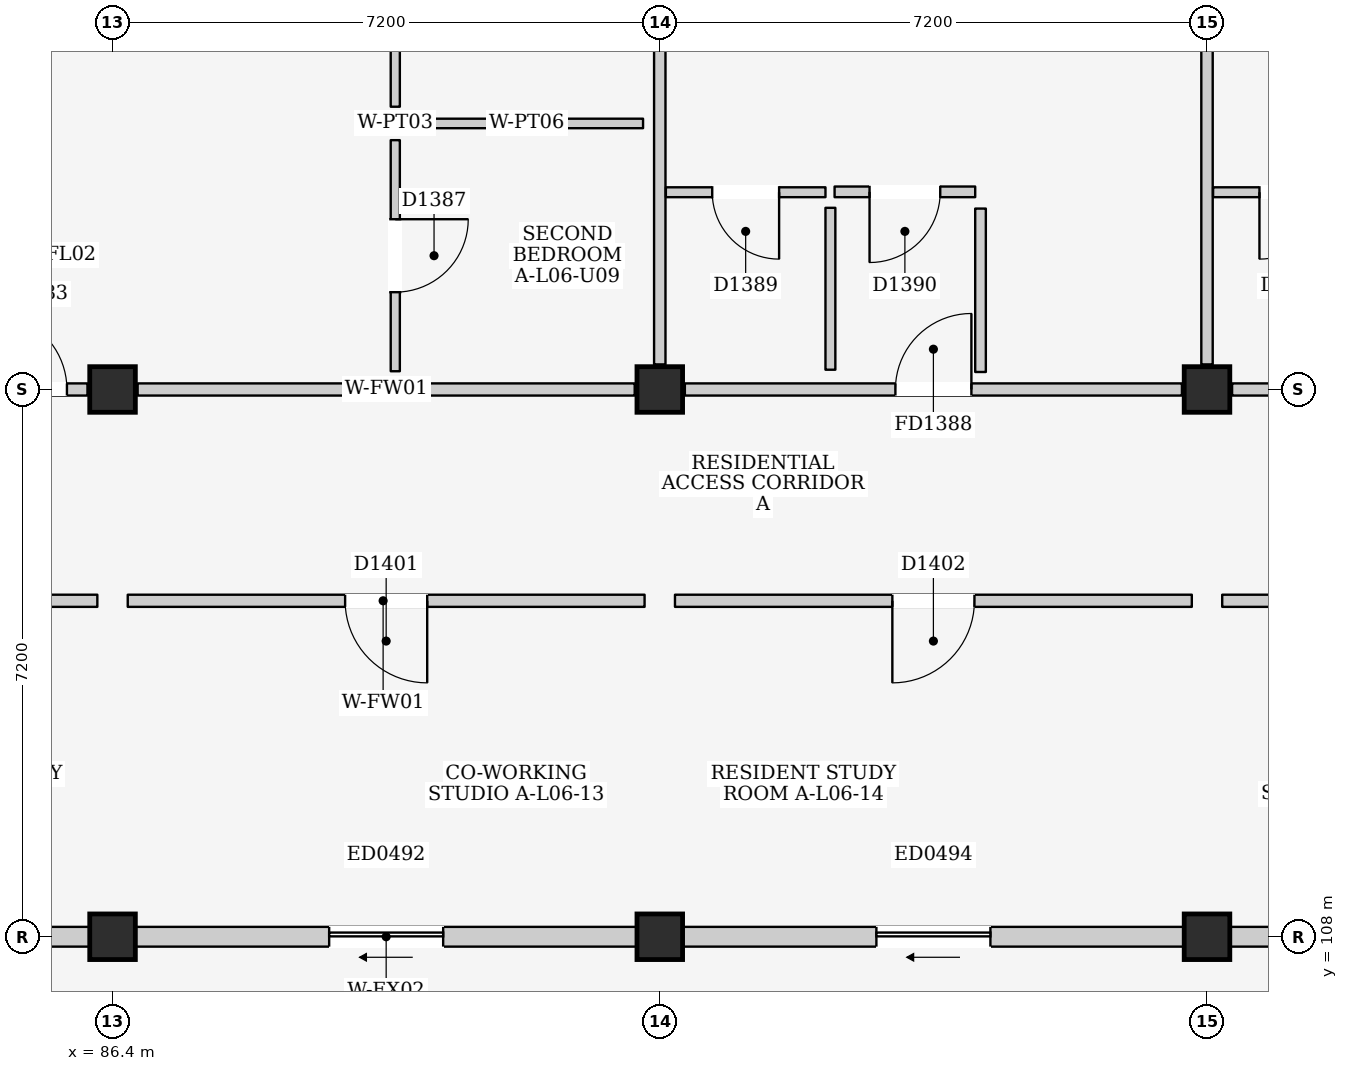
"""IFC4 building model, lengths in metres.
Left out: names, types, materials, properties, quantities, classifications, styles, units other than length and angle.
Written with IfcOpenShell. Run it as: python <this file> out.ifc"""

import sys

from ifc_helpers import new_model, si_unit, direction, frame, frame_2d, origin, origin_2d, place, context, subcontext, project, spatial, rectangle, extrude, element, fill, save


model = new_model("IFC4")
c1 = context("Model", 3, precision=1e-05, world=origin(), true_north=direction((0.0, 1.0)))
c2 = subcontext(c1, "Body", "Model", "MODEL_VIEW")
j1 = project(units=[si_unit("LENGTHUNIT", "METRE"), si_unit("PLANEANGLEUNIT", "RADIAN")], contexts=[c1])
p1 = place(None, origin())
s1 = spatial("IfcSite", under=j1, at=p1, CompositionType="ELEMENT")
p2 = place(p1, origin())
s2 = spatial("IfcBuilding", under=s1, at=p2, CompositionType="ELEMENT")
p3 = place(p2, frame((0.0, 0.0, 21.9)))
s3 = spatial("IfcBuildingStorey", under=s2, at=p3, CompositionType="ELEMENT", Elevation=21.9)
for number, where, z_axis, x_axis in (
    (1, (86.4, 108.0, 0.0), (0.0, 0.0, 1.0), (1.0, 0.0, 0.0)),
    (2, (86.4, 115.2, 0.0), (0.0, 0.0, 1.0), (1.0, 0.0, 0.0)),
    (3, (93.6, 108.0, 0.0), (0.0, 0.0, 1.0), (1.0, 0.0, 0.0)),
    (4, (93.6, 115.2, 0.0), (0.0, 0.0, 1.0), (1.0, 0.0, 0.0)),
    (5, (100.8, 108.0, 0.0), (0.0, 0.0, 1.0), (1.0, 0.0, 0.0)),
    (6, (100.8, 115.2, 0.0), (0.0, 0.0, 1.0), (1.0, 0.0, 0.0)),
):
    element("IfcColumn", number, at=place(p3, frame(where, z_axis=z_axis, x_axis=x_axis)), inside=s3, PredefinedType="COLUMN", context=c2, shape_type="SweptSolid", body=[
        extrude(rectangle(XDim=0.6, YDim=0.6, at=origin_2d()), origin(), (0.0, 0.0, 1.0), 3.2),
    ])
p4 = place(p3, frame((79.5, 108.0, 0.0), z_axis=(0.0, 0.0, 1.0), x_axis=(1.0, 0.0, 0.0)))
e7 = element("IfcWall", 7, at=p4, inside=s3, PredefinedType="ELEMENTEDWALL", context=c2, shape_type="SweptSolid", body=[
    extrude(rectangle(XDim=6.6, YDim=0.26, at=frame_2d((3.3, 0.0))), origin(), (0.0, 0.0, 1.0), 2.315),
])
p5 = place(p4, frame((2.55, 0.0, 0.0)))
e8 = element("IfcOpeningElement", 8, at=p5, cuts=e7, PredefinedType="OPENING", context=c2, shape_type="SweptSolid", body=[
    extrude(rectangle(XDim=1.5, YDim=2.12, at=frame_2d((0.75, 1.06))), frame((0.0, 0.145, 0.0), z_axis=(0.0, -1.0, 0.0), x_axis=(1.0, 0.0, 0.0)), (0.0, 0.0, 1.0), 0.29),
])
p6 = place(p3, frame((86.7, 108.0, 0.0), z_axis=(0.0, 0.0, 1.0), x_axis=(1.0, 0.0, 0.0)))
e9 = element("IfcWall", 9, at=p6, inside=s3, PredefinedType="ELEMENTEDWALL", context=c2, shape_type="SweptSolid", body=[
    extrude(rectangle(XDim=6.6, YDim=0.26, at=frame_2d((3.3, 0.0))), origin(), (0.0, 0.0, 1.0), 2.315),
])
p7 = place(p6, frame((2.55, 0.0, 0.0)))
e10 = element("IfcOpeningElement", 10, at=p7, cuts=e9, PredefinedType="OPENING", context=c2, shape_type="SweptSolid", body=[
    extrude(rectangle(XDim=1.5, YDim=2.12, at=frame_2d((0.75, 1.06))), frame((0.0, 0.145, 0.0), z_axis=(0.0, -1.0, 0.0), x_axis=(1.0, 0.0, 0.0)), (0.0, 0.0, 1.0), 0.29),
])
p8 = place(p3, frame((93.9, 108.0, 0.0), z_axis=(0.0, 0.0, 1.0), x_axis=(1.0, 0.0, 0.0)))
e11 = element("IfcWall", 11, at=p8, inside=s3, PredefinedType="ELEMENTEDWALL", context=c2, shape_type="SweptSolid", body=[
    extrude(rectangle(XDim=6.6, YDim=0.26, at=frame_2d((3.3, 0.0))), origin(), (0.0, 0.0, 1.0), 2.315),
])
p9 = place(p8, frame((2.55, 0.0, 0.0)))
e12 = element("IfcOpeningElement", 12, at=p9, cuts=e11, PredefinedType="OPENING", context=c2, shape_type="SweptSolid", body=[
    extrude(rectangle(XDim=1.5, YDim=2.12, at=frame_2d((0.75, 1.06))), frame((0.0, 0.145, 0.0), z_axis=(0.0, -1.0, 0.0), x_axis=(1.0, 0.0, 0.0)), (0.0, 0.0, 1.0), 0.29),
])
p10 = place(p3, frame((101.1, 108.0, 0.0), z_axis=(0.0, 0.0, 1.0), x_axis=(1.0, 0.0, 0.0)))
e13 = element("IfcWall", 13, at=p10, inside=s3, PredefinedType="ELEMENTEDWALL", context=c2, shape_type="SweptSolid", body=[
    extrude(rectangle(XDim=6.6, YDim=0.26, at=frame_2d((3.3, 0.0))), origin(), (0.0, 0.0, 1.0), 2.315),
])
p11 = place(p10, frame((2.55, 0.0, 0.0)))
e14 = element("IfcOpeningElement", 14, at=p11, cuts=e13, PredefinedType="OPENING", context=c2, shape_type="SweptSolid", body=[
    extrude(rectangle(XDim=1.5, YDim=2.12, at=frame_2d((0.75, 1.06))), frame((0.0, 0.145, 0.0), z_axis=(0.0, -1.0, 0.0), x_axis=(1.0, 0.0, 0.0)), (0.0, 0.0, 1.0), 0.29),
])
p12 = place(p3, frame((79.53, 115.2, 0.0), z_axis=(0.0, 0.0, 1.0), x_axis=(1.0, 0.0, 0.0)))
e15 = element("IfcWall", 15, at=p12, inside=s3, PredefinedType="PARTITIONING", context=c2, shape_type="SweptSolid", body=[
    extrude(rectangle(XDim=6.54, YDim=0.16, at=frame_2d((3.27, 0.0))), origin(), (0.0, 0.0, 1.0), 2.315),
])
p13 = place(p12, frame((5.27, 0.0, 0.0)))
e16 = element("IfcOpeningElement", 16, at=p13, cuts=e15, PredefinedType="OPENING", context=c2, shape_type="SweptSolid", body=[
    extrude(rectangle(XDim=1.0, YDim=2.15, at=frame_2d((0.5, 1.075))), frame((0.0, 0.095, 0.0), z_axis=(0.0, -1.0, 0.0), x_axis=(1.0, 0.0, 0.0)), (0.0, 0.0, 1.0), 0.19),
])
p14 = place(p3, frame((86.73, 115.2, 0.0), z_axis=(0.0, 0.0, 1.0), x_axis=(1.0, 0.0, 0.0)))
e17 = element("IfcWall", 17, at=p14, inside=s3, PredefinedType="PARTITIONING", context=c2, shape_type="SweptSolid", body=[
    extrude(rectangle(XDim=6.54, YDim=0.16, at=frame_2d((3.27, 0.0))), origin(), (0.0, 0.0, 1.0), 2.315),
])
p15 = place(p3, frame((93.6, 115.53, 0.0), z_axis=(0.0, 0.0, 1.0), x_axis=(0.0, 1.0, 0.0)))
e18 = element("IfcWall", 18, at=p15, inside=s3, PredefinedType="PARTITIONING", context=c2, shape_type="SweptSolid", body=[
    extrude(rectangle(XDim=6.54, YDim=0.15, at=frame_2d((3.27, 0.0))), origin(), (0.0, 0.0, 1.0), 2.465),
])
p16 = place(p3, frame((90.12, 118.92, 0.0), z_axis=(0.0, 0.0, 1.0), x_axis=(0.0, 1.0, 0.0)))
e19 = element("IfcWall", 19, at=p16, inside=s3, PredefinedType="PARTITIONING", context=c2, shape_type="SweptSolid", body=[
    extrude(rectangle(XDim=3.04, YDim=0.12, at=frame_2d((1.52, 0.0))), origin(), (0.0, 0.0, 1.0), 2.98),
])
p17 = place(p16, frame((1.045, 0.0, 0.0)))
e20 = element("IfcOpeningElement", 20, at=p17, cuts=e19, PredefinedType="OPENING", context=c2, shape_type="SweptSolid", body=[
    extrude(rectangle(XDim=0.95, YDim=2.15, at=frame_2d((0.475, 1.075))), frame((0.0, 0.075, 0.0), z_axis=(0.0, -1.0, 0.0), x_axis=(1.0, 0.0, 0.0)), (0.0, 0.0, 1.0), 0.15),
])
p18 = place(p3, frame((90.32, 118.7, 0.0), z_axis=(0.0, 0.0, 1.0), x_axis=(1.0, 0.0, 0.0)))
e21 = element("IfcWall", 21, at=p18, inside=s3, PredefinedType="PARTITIONING", context=c2, shape_type="SweptSolid", body=[
    extrude(rectangle(XDim=3.06, YDim=0.125, at=frame_2d((1.53, 0.0))), origin(), (0.0, 0.0, 1.0), 2.98),
])
p19 = place(p3, frame((90.12, 115.44, 0.0), z_axis=(0.0, 0.0, 1.0), x_axis=(0.0, 1.0, 0.0)))
e22 = element("IfcWall", 22, at=p19, inside=s3, PredefinedType="PARTITIONING", context=c2, shape_type="SweptSolid", body=[
    extrude(rectangle(XDim=3.04, YDim=0.12, at=frame_2d((1.52, 0.0))), origin(), (0.0, 0.0, 1.0), 2.98),
])
p20 = place(p19, frame((1.04, 0.0, 0.0)))
e23 = element("IfcOpeningElement", 23, at=p20, cuts=e22, PredefinedType="OPENING", context=c2, shape_type="SweptSolid", body=[
    extrude(rectangle(XDim=0.96, YDim=2.15, at=frame_2d((0.48, 1.075))), frame((0.0, 0.075, 0.0), z_axis=(0.0, -1.0, 0.0), x_axis=(1.0, 0.0, 0.0)), (0.0, 0.0, 1.0), 0.15),
])
p21 = place(p3, frame((93.93, 115.2, 0.0), z_axis=(0.0, 0.0, 1.0), x_axis=(1.0, 0.0, 0.0)))
e24 = element("IfcWall", 24, at=p21, inside=s3, PredefinedType="PARTITIONING", context=c2, shape_type="SweptSolid", body=[
    extrude(rectangle(XDim=6.54, YDim=0.16, at=frame_2d((3.27, 0.0))), origin(), (0.0, 0.0, 1.0), 2.315),
])
p22 = place(p21, frame((2.77, 0.0, 0.0)))
e25 = element("IfcOpeningElement", 25, at=p22, cuts=e24, PredefinedType="OPENING", context=c2, shape_type="SweptSolid", body=[
    extrude(rectangle(XDim=1.0, YDim=2.15, at=frame_2d((0.5, 1.075))), frame((0.0, 0.095, 0.0), z_axis=(0.0, -1.0, 0.0), x_axis=(1.0, 0.0, 0.0)), (0.0, 0.0, 1.0), 0.19),
])
p23 = place(p3, frame((100.8, 115.53, 0.0), z_axis=(0.0, 0.0, 1.0), x_axis=(0.0, 1.0, 0.0)))
e26 = element("IfcWall", 26, at=p23, inside=s3, PredefinedType="PARTITIONING", context=c2, shape_type="SweptSolid", body=[
    extrude(rectangle(XDim=6.54, YDim=0.15, at=frame_2d((3.27, 0.0))), origin(), (0.0, 0.0, 1.0), 2.465),
])
p24 = place(p3, frame((93.68, 117.795, 0.0), z_axis=(0.0, 0.0, 1.0), x_axis=(1.0, 0.0, 0.0)))
e27 = element("IfcWall", 27, at=p24, inside=s3, PredefinedType="PARTITIONING", context=c2, shape_type="SweptSolid", body=[
    extrude(rectangle(XDim=2.1, YDim=0.13, at=frame_2d((1.05, 0.0))), origin(), (0.0, 0.0, 1.0), 2.98),
])
p25 = place(p24, frame((0.61, 0.0, 0.0)))
e28 = element("IfcOpeningElement", 28, at=p25, cuts=e27, PredefinedType="OPENING", context=c2, shape_type="SweptSolid", body=[
    extrude(rectangle(XDim=0.88, YDim=2.1, at=frame_2d((0.44, 1.05))), frame((0.0, 0.08, 0.0), z_axis=(0.0, -1.0, 0.0), x_axis=(1.0, 0.0, 0.0)), (0.0, 0.0, 1.0), 0.16),
])
p26 = place(p3, frame((95.845, 115.46, 0.0), z_axis=(0.0, 0.0, 1.0), x_axis=(0.0, 1.0, 0.0)))
e29 = element("IfcWall", 29, at=p26, inside=s3, PredefinedType="PARTITIONING", context=c2, shape_type="SweptSolid", body=[
    extrude(rectangle(XDim=2.13, YDim=0.13, at=frame_2d((1.065, 0.0))), origin(), (0.0, 0.0, 1.0), 2.98),
])
p27 = place(p3, frame((95.9, 117.8, 0.0), z_axis=(0.0, 0.0, 1.0), x_axis=(1.0, 0.0, 0.0)))
e30 = element("IfcWall", 30, at=p27, inside=s3, PredefinedType="PARTITIONING", context=c2, shape_type="SweptSolid", body=[
    extrude(rectangle(XDim=1.85, YDim=0.14, at=frame_2d((0.925, 0.0))), origin(), (0.0, 0.0, 1.0), 2.98),
])
p28 = place(p27, frame((0.46, 0.0, 0.0)))
e31 = element("IfcOpeningElement", 31, at=p28, cuts=e30, PredefinedType="OPENING", context=c2, shape_type="SweptSolid", body=[
    extrude(rectangle(XDim=0.93, YDim=2.14, at=frame_2d((0.465, 1.07))), frame((0.0, 0.085, 0.0), z_axis=(0.0, -1.0, 0.0), x_axis=(1.0, 0.0, 0.0)), (0.0, 0.0, 1.0), 0.17),
])
p29 = place(p3, frame((97.82, 115.43, 0.0), z_axis=(0.0, 0.0, 1.0), x_axis=(0.0, 1.0, 0.0)))
e32 = element("IfcWall", 32, at=p29, inside=s3, PredefinedType="PARTITIONING", context=c2, shape_type="SweptSolid", body=[
    extrude(rectangle(XDim=2.15, YDim=0.14, at=frame_2d((1.075, 0.0))), origin(), (0.0, 0.0, 1.0), 2.98),
])
p30 = place(p3, frame((101.13, 115.2, 0.0), z_axis=(0.0, 0.0, 1.0), x_axis=(1.0, 0.0, 0.0)))
e33 = element("IfcWall", 33, at=p30, inside=s3, PredefinedType="PARTITIONING", context=c2, shape_type="SweptSolid", body=[
    extrude(rectangle(XDim=6.54, YDim=0.16, at=frame_2d((3.27, 0.0))), origin(), (0.0, 0.0, 1.0), 2.315),
])
p31 = place(p30, frame((2.77, 0.0, 0.0)))
e34 = element("IfcOpeningElement", 34, at=p31, cuts=e33, PredefinedType="OPENING", context=c2, shape_type="SweptSolid", body=[
    extrude(rectangle(XDim=1.0, YDim=2.15, at=frame_2d((0.5, 1.075))), frame((0.0, 0.095, 0.0), z_axis=(0.0, -1.0, 0.0), x_axis=(1.0, 0.0, 0.0)), (0.0, 0.0, 1.0), 0.19),
])
p32 = place(p3, frame((100.88, 117.795, 0.0), z_axis=(0.0, 0.0, 1.0), x_axis=(1.0, 0.0, 0.0)))
e35 = element("IfcWall", 35, at=p32, inside=s3, PredefinedType="PARTITIONING", context=c2, shape_type="SweptSolid", body=[
    extrude(rectangle(XDim=2.1, YDim=0.13, at=frame_2d((1.05, 0.0))), origin(), (0.0, 0.0, 1.0), 2.98),
])
p33 = place(p32, frame((0.61, 0.0, 0.0)))
e36 = element("IfcOpeningElement", 36, at=p33, cuts=e35, PredefinedType="OPENING", context=c2, shape_type="SweptSolid", body=[
    extrude(rectangle(XDim=0.88, YDim=2.1, at=frame_2d((0.44, 1.05))), frame((0.0, 0.08, 0.0), z_axis=(0.0, -1.0, 0.0), x_axis=(1.0, 0.0, 0.0)), (0.0, 0.0, 1.0), 0.16),
])
p34 = place(p3, frame((79.4, 112.42, 0.0), z_axis=(0.0, 0.0, 1.0), x_axis=(1.0, 0.0, 0.0)))
e37 = element("IfcWall", 37, at=p34, inside=s3, PredefinedType="PARTITIONING", context=c2, shape_type="SweptSolid", body=[
    extrude(rectangle(XDim=6.8, YDim=0.16, at=frame_2d((3.4, 0.0))), origin(), (0.0, 0.0, 1.0), 2.98),
])
p35 = place(p34, frame((2.86, 0.0, 0.0)))
e38 = element("IfcOpeningElement", 38, at=p35, cuts=e37, PredefinedType="OPENING", context=c2, shape_type="SweptSolid", body=[
    extrude(rectangle(XDim=1.08, YDim=2.22, at=frame_2d((0.54, 1.11))), frame((0.0, 0.095, 0.0), z_axis=(0.0, -1.0, 0.0), x_axis=(1.0, 0.0, 0.0)), (0.0, 0.0, 1.0), 0.19),
])
p36 = place(p3, frame((86.6, 112.42, 0.0), z_axis=(0.0, 0.0, 1.0), x_axis=(1.0, 0.0, 0.0)))
e39 = element("IfcWall", 39, at=p36, inside=s3, PredefinedType="PARTITIONING", context=c2, shape_type="SweptSolid", body=[
    extrude(rectangle(XDim=6.8, YDim=0.16, at=frame_2d((3.4, 0.0))), origin(), (0.0, 0.0, 1.0), 2.98),
])
p37 = place(p36, frame((2.86, 0.0, 0.0)))
e40 = element("IfcOpeningElement", 40, at=p37, cuts=e39, PredefinedType="OPENING", context=c2, shape_type="SweptSolid", body=[
    extrude(rectangle(XDim=1.08, YDim=2.22, at=frame_2d((0.54, 1.11))), frame((0.0, 0.095, 0.0), z_axis=(0.0, -1.0, 0.0), x_axis=(1.0, 0.0, 0.0)), (0.0, 0.0, 1.0), 0.19),
])
p38 = place(p3, frame((93.8, 112.42, 0.0), z_axis=(0.0, 0.0, 1.0), x_axis=(1.0, 0.0, 0.0)))
e41 = element("IfcWall", 41, at=p38, inside=s3, PredefinedType="PARTITIONING", context=c2, shape_type="SweptSolid", body=[
    extrude(rectangle(XDim=6.8, YDim=0.16, at=frame_2d((3.4, 0.0))), origin(), (0.0, 0.0, 1.0), 2.98),
])
p39 = place(p38, frame((2.86, 0.0, 0.0)))
e42 = element("IfcOpeningElement", 42, at=p39, cuts=e41, PredefinedType="OPENING", context=c2, shape_type="SweptSolid", body=[
    extrude(rectangle(XDim=1.08, YDim=2.22, at=frame_2d((0.54, 1.11))), frame((0.0, 0.095, 0.0), z_axis=(0.0, -1.0, 0.0), x_axis=(1.0, 0.0, 0.0)), (0.0, 0.0, 1.0), 0.19),
])
p40 = place(p3, frame((101.0, 112.42, 0.0), z_axis=(0.0, 0.0, 1.0), x_axis=(1.0, 0.0, 0.0)))
e43 = element("IfcWall", 43, at=p40, inside=s3, PredefinedType="PARTITIONING", context=c2, shape_type="SweptSolid", body=[
    extrude(rectangle(XDim=6.72, YDim=0.16, at=frame_2d((3.36, 0.0))), origin(), (0.0, 0.0, 1.0), 2.98),
])
p41 = place(p40, frame((2.82, 0.0, 0.0)))
e44 = element("IfcOpeningElement", 44, at=p41, cuts=e43, PredefinedType="OPENING", context=c2, shape_type="SweptSolid", body=[
    extrude(rectangle(XDim=1.08, YDim=2.22, at=frame_2d((0.54, 1.11))), frame((0.0, 0.095, 0.0), z_axis=(0.0, -1.0, 0.0), x_axis=(1.0, 0.0, 0.0)), (0.0, 0.0, 1.0), 0.19),
])
p42 = place(p7, frame((1.5, 0.0, 0.0), z_axis=(0.0, 0.0, 1.0), x_axis=(-1.0, 0.0, 0.0)))
e45 = element("IfcDoor", 45, at=p42, inside=s3, OperationType="SLIDING_TO_LEFT", PredefinedType="DOOR", context=c2, shape_type="SweptSolid", body=[
    extrude(rectangle(XDim=1.5, YDim=2.12, at=frame_2d((0.75, 1.06))), frame((0.0, 0.025, 0.0), z_axis=(0.0, -1.0, 0.0), x_axis=(1.0, 0.0, 0.0)), (0.0, 0.0, 1.0), 0.05),
])
fill(e10, e45)
p43 = place(p9, frame((1.5, 0.0, 0.0), z_axis=(0.0, 0.0, 1.0), x_axis=(-1.0, 0.0, 0.0)))
e46 = element("IfcDoor", 46, at=p43, inside=s3, OperationType="SLIDING_TO_LEFT", PredefinedType="DOOR", context=c2, shape_type="SweptSolid", body=[
    extrude(rectangle(XDim=1.5, YDim=2.12, at=frame_2d((0.75, 1.06))), frame((0.0, 0.025, 0.0), z_axis=(0.0, -1.0, 0.0), x_axis=(1.0, 0.0, 0.0)), (0.0, 0.0, 1.0), 0.05),
])
fill(e12, e46)
p44 = place(p13, origin())
e47 = element("IfcDoor", 47, at=p44, inside=s3, OperationType="SINGLE_SWING_LEFT", PredefinedType="DOOR", context=c2, shape_type="SweptSolid", body=[
    extrude(rectangle(XDim=1.0, YDim=2.15, at=frame_2d((0.5, 1.075))), frame((0.0, 0.025, 0.0), z_axis=(0.0, -1.0, 0.0), x_axis=(1.0, 0.0, 0.0)), (0.0, 0.0, 1.0), 0.05),
])
fill(e16, e47)
p45 = place(p20, frame((0.96, 0.0, 0.0), z_axis=(0.0, 0.0, 1.0), x_axis=(-1.0, 0.0, 0.0)))
e48 = element("IfcDoor", 48, at=p45, inside=s3, OperationType="SINGLE_SWING_LEFT", PredefinedType="DOOR", context=c2, shape_type="SweptSolid", body=[
    extrude(rectangle(XDim=0.96, YDim=2.15, at=frame_2d((0.48, 1.075))), frame((0.0, 0.025, 0.0), z_axis=(0.0, -1.0, 0.0), x_axis=(1.0, 0.0, 0.0)), (0.0, 0.0, 1.0), 0.05),
])
fill(e23, e48)
p46 = place(p22, origin())
e49 = element("IfcDoor", 49, at=p46, inside=s3, OperationType="SINGLE_SWING_RIGHT", PredefinedType="DOOR", context=c2, shape_type="SweptSolid", body=[
    extrude(rectangle(XDim=1.0, YDim=2.15, at=frame_2d((0.5, 1.075))), frame((0.0, 0.025, 0.0), z_axis=(0.0, -1.0, 0.0), x_axis=(1.0, 0.0, 0.0)), (0.0, 0.0, 1.0), 0.05),
])
fill(e25, e49)
p47 = place(p25, frame((0.88, 0.0, 0.0), z_axis=(0.0, 0.0, 1.0), x_axis=(-1.0, 0.0, 0.0)))
e50 = element("IfcDoor", 50, at=p47, inside=s3, OperationType="SINGLE_SWING_LEFT", PredefinedType="DOOR", context=c2, shape_type="SweptSolid", body=[
    extrude(rectangle(XDim=0.88, YDim=2.1, at=frame_2d((0.44, 1.05))), frame((0.0, 0.025, 0.0), z_axis=(0.0, -1.0, 0.0), x_axis=(1.0, 0.0, 0.0)), (0.0, 0.0, 1.0), 0.05),
])
fill(e28, e50)
p48 = place(p28, frame((0.93, 0.0, 0.0), z_axis=(0.0, 0.0, 1.0), x_axis=(-1.0, 0.0, 0.0)))
e51 = element("IfcDoor", 51, at=p48, inside=s3, OperationType="SINGLE_SWING_RIGHT", PredefinedType="DOOR", context=c2, shape_type="SweptSolid", body=[
    extrude(rectangle(XDim=0.93, YDim=2.14, at=frame_2d((0.465, 1.07))), frame((0.0, 0.025, 0.0), z_axis=(0.0, -1.0, 0.0), x_axis=(1.0, 0.0, 0.0)), (0.0, 0.0, 1.0), 0.05),
])
fill(e31, e51)
p49 = place(p33, frame((0.88, 0.0, 0.0), z_axis=(0.0, 0.0, 1.0), x_axis=(-1.0, 0.0, 0.0)))
e52 = element("IfcDoor", 52, at=p49, inside=s3, OperationType="SINGLE_SWING_RIGHT", PredefinedType="DOOR", context=c2, shape_type="SweptSolid", body=[
    extrude(rectangle(XDim=0.88, YDim=2.1, at=frame_2d((0.44, 1.05))), frame((0.0, 0.025, 0.0), z_axis=(0.0, -1.0, 0.0), x_axis=(1.0, 0.0, 0.0)), (0.0, 0.0, 1.0), 0.05),
])
fill(e36, e52)
p50 = place(p37, frame((1.08, 0.0, 0.0), z_axis=(0.0, 0.0, 1.0), x_axis=(-1.0, 0.0, 0.0)))
e53 = element("IfcDoor", 53, at=p50, inside=s3, OperationType="SINGLE_SWING_LEFT", PredefinedType="DOOR", context=c2, shape_type="SweptSolid", body=[
    extrude(rectangle(XDim=1.08, YDim=2.22, at=frame_2d((0.54, 1.11))), frame((0.0, 0.025, 0.0), z_axis=(0.0, -1.0, 0.0), x_axis=(1.0, 0.0, 0.0)), (0.0, 0.0, 1.0), 0.05),
])
fill(e40, e53)
p51 = place(p39, frame((1.08, 0.0, 0.0), z_axis=(0.0, 0.0, 1.0), x_axis=(-1.0, 0.0, 0.0)))
e54 = element("IfcDoor", 54, at=p51, inside=s3, OperationType="SINGLE_SWING_RIGHT", PredefinedType="DOOR", context=c2, shape_type="SweptSolid", body=[
    extrude(rectangle(XDim=1.08, YDim=2.22, at=frame_2d((0.54, 1.11))), frame((0.0, 0.025, 0.0), z_axis=(0.0, -1.0, 0.0), x_axis=(1.0, 0.0, 0.0)), (0.0, 0.0, 1.0), 0.05),
])
fill(e42, e54)
save(model, sys.argv[1])
